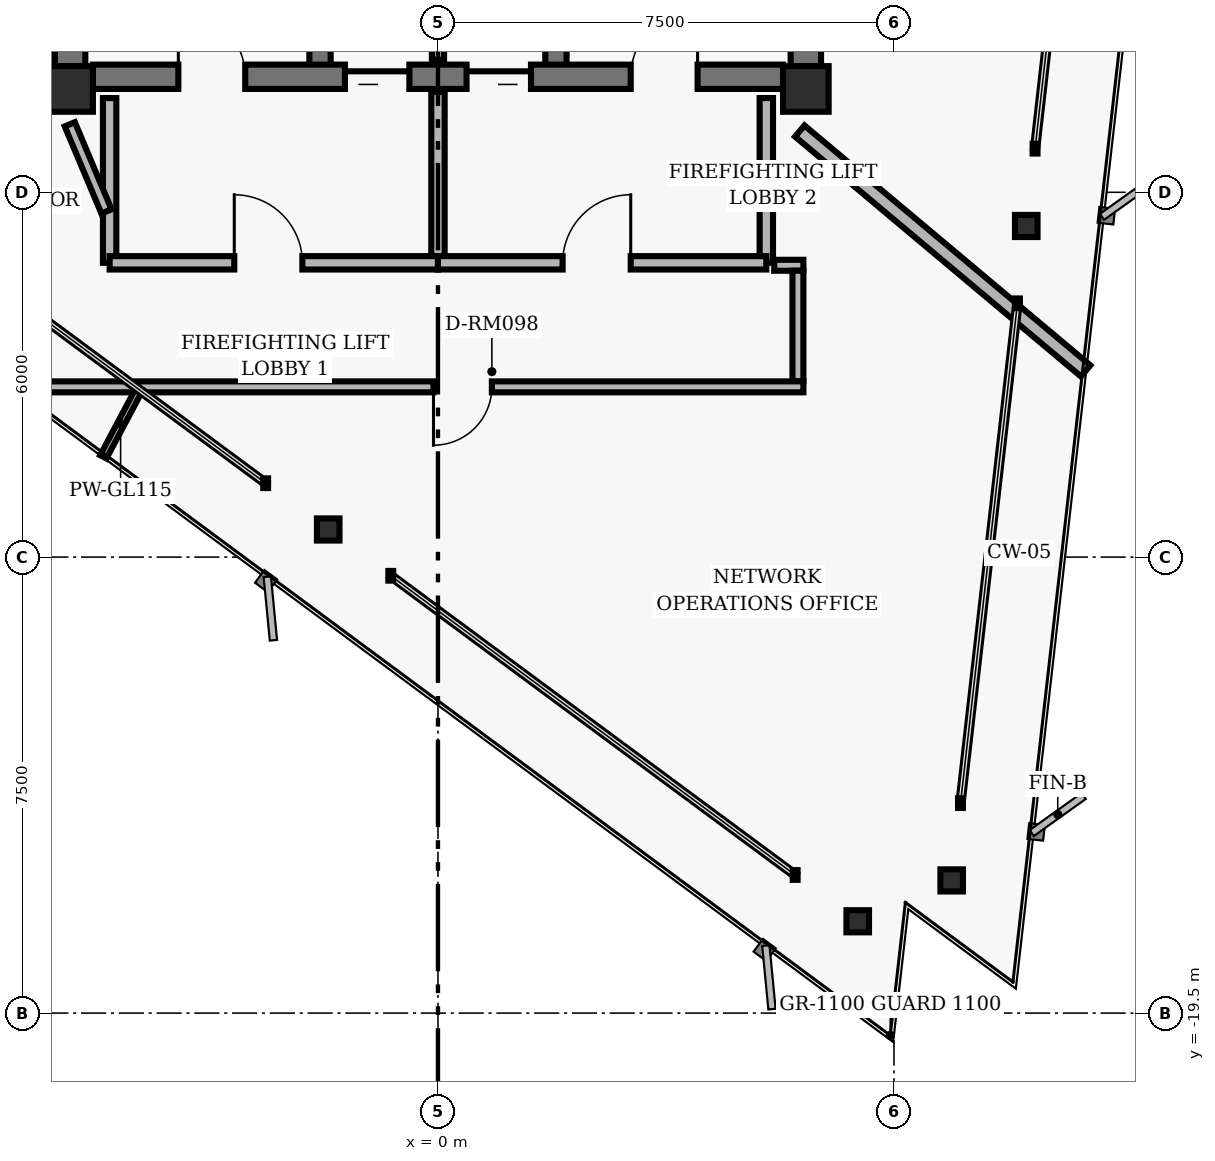
"""IFC4 building model, lengths in metres.
Left out: names, types, materials, properties, quantities, classifications, styles, units other than length and angle.
Written with IfcOpenShell. Run it as: python <this file> out.ifc"""

import sys

from ifc_helpers import new_model, si_unit, direction, frame, frame_2d, origin, origin_2d, place, context, subcontext, project, spatial, rectangle, hollow_rectangle, i_section, extrude, element, fill, save


model = new_model("IFC4")
c1 = context("Model", 3, precision=1e-05, world=origin(), true_north=direction((0.0, 1.0)))
c2 = subcontext(c1, "Body", "Model", "MODEL_VIEW")
j1 = project(units=[si_unit("LENGTHUNIT", "METRE"), si_unit("PLANEANGLEUNIT", "RADIAN")], contexts=[c1])
p1 = place(None, origin())
s1 = spatial("IfcSite", under=j1, at=p1, CompositionType="ELEMENT")
p2 = place(p1, origin())
s2 = spatial("IfcBuilding", under=s1, at=p2, CompositionType="ELEMENT")
p3 = place(p2, frame((0.0, 0.0, 236.16)))
s3 = spatial("IfcBuildingStorey", under=s2, at=p3, CompositionType="ELEMENT", Elevation=236.16)
for number, where, z_axis, x_axis in (
    (1, (-6.05, -4.3, 0.0), (0.0, 0.0, 1.0), (1.0, 0.0, 0.0)),
    (2, (6.05, -4.3, 0.0), (0.0, 0.0, 1.0), (1.0, 0.0, 0.0)),
):
    element("IfcColumn", number, at=place(p3, frame(where, z_axis=z_axis, x_axis=x_axis)), inside=s3, PredefinedType="COLUMN", context=c2, shape_type="SweptSolid", body=[
        extrude(hollow_rectangle(XDim=0.75, YDim=0.75, WallThickness=0.05, InnerFilletRadius=0.02, OuterFilletRadius=0.04, at=origin_2d()), origin(), (0.0, 0.0, 1.0), 3.04),
    ])
for number, where, z_axis, x_axis in (
    (3, (-6.05, -3.925, 0.0), (0.0, 0.0, 1.0), (0.0, 1.0, 0.0)),
    (4, (6.05, -3.925, 0.0), (0.0, 0.0, 1.0), (0.0, 1.0, 0.0)),
):
    element("IfcWall", number, at=place(p3, frame(where, z_axis=z_axis, x_axis=x_axis)), inside=s3, PredefinedType="SHEAR", context=c2, shape_type="SweptSolid", body=[
        extrude(rectangle(XDim=3.55, YDim=0.5, at=frame_2d((1.775, 0.0))), origin(), (0.0, 0.0, 1.0), 2.618),
    ])
for number, where, z_axis, x_axis in (
    (5, (-1.94, -4.1, 0.0), (0.0, 0.0, 1.0), (0.0, 1.0, 0.0)),
    (6, (1.94, -4.1, 0.0), (0.0, 0.0, 1.0), (0.0, 1.0, 0.0)),
):
    element("IfcWall", number, at=place(p3, frame(where, z_axis=z_axis, x_axis=x_axis)), inside=s3, PredefinedType="SHEAR", context=c2, shape_type="SweptSolid", body=[
        extrude(rectangle(XDim=8.2, YDim=0.35, at=frame_2d((4.1, 0.0))), origin(), (0.0, 0.0, 1.0), 2.618),
    ])
p4 = place(p3, frame((-5.675, -4.1, 0.0), z_axis=(0.0, 0.0, 1.0), x_axis=(1.0, 0.0, 0.0)))
e7 = element("IfcWall", 7, at=p4, inside=s3, PredefinedType="SHEAR", context=c2, shape_type="SweptSolid", body=[
    extrude(rectangle(XDim=11.35, YDim=0.4, at=frame_2d((5.675, 0.0))), origin(), (0.0, 0.0, 1.0), 2.618),
])
p5 = place(p4, frame((1.405, 0.0, 0.0)))
e8 = element("IfcOpeningElement", 8, at=p5, cuts=e7, PredefinedType="OPENING", context=c2, shape_type="SweptSolid", body=[
    extrude(rectangle(XDim=1.1, YDim=2.04, at=frame_2d((0.55, 1.02))), frame((0.0, 0.21, 0.0), z_axis=(0.0, -1.0, 0.0), x_axis=(1.0, 0.0, 0.0)), (0.0, 0.0, 1.0), 0.42),
])
p6 = place(p4, frame((8.845, 0.0, 0.0)))
e9 = element("IfcOpeningElement", 9, at=p6, cuts=e7, PredefinedType="OPENING", context=c2, shape_type="SweptSolid", body=[
    extrude(rectangle(XDim=1.1, YDim=2.04, at=frame_2d((0.55, 1.02))), frame((0.0, 0.21, 0.0), z_axis=(0.0, -1.0, 0.0), x_axis=(1.0, 0.0, 0.0)), (0.0, 0.0, 1.0), 0.42),
])
p7 = place(p4, frame((4.145, 0.0, 0.0)))
e10 = element("IfcOpeningElement", 10, at=p7, cuts=e7, PredefinedType="OPENING", context=c2, shape_type="SweptSolid", body=[
    extrude(rectangle(XDim=1.06, YDim=2.04, at=frame_2d((0.53, 1.02))), frame((0.0, 0.21, 0.0), z_axis=(0.0, -1.0, 0.0), x_axis=(1.0, 0.0, 0.0)), (0.0, 0.0, 1.0), 0.42),
])
p8 = place(p4, frame((6.145, 0.0, 0.0)))
e11 = element("IfcOpeningElement", 11, at=p8, cuts=e7, PredefinedType="OPENING", context=c2, shape_type="SweptSolid", body=[
    extrude(rectangle(XDim=1.06, YDim=2.04, at=frame_2d((0.53, 1.02))), frame((0.0, 0.21, 0.0), z_axis=(0.0, -1.0, 0.0), x_axis=(1.0, 0.0, 0.0)), (0.0, 0.0, 1.0), 0.42),
])
for number, where, z_axis, x_axis in (
    (12, (8.448, -17.318, 0.0), (0.0, 0.0, 1.0), (1.0, 0.0, 0.0)),
    (13, (9.675, -6.554, 0.0), (0.0, 0.0, 1.0), (1.0, 0.0, 0.0)),
    (14, (-1.805, -11.546, 0.0), (0.0, 0.0, 1.0), (1.0, 0.0, 0.0)),
    (15, (6.903, -17.99, 0.0), (0.0, 0.0, 1.0), (1.0, 0.0, 0.0)),
):
    element("IfcColumn", number, at=place(p3, frame(where, z_axis=z_axis, x_axis=x_axis)), inside=s3, PredefinedType="COLUMN", context=c2, shape_type="SweptSolid", body=[
        extrude(i_section(OverallWidth=0.371, OverallDepth=0.364, WebThickness=0.013, FlangeThickness=0.022, FilletRadius=0.015, at=origin_2d()), origin(), (0.0, 0.0, 1.0), 3.04),
    ])
p9 = place(p3, frame((0.0, -3.82, 0.0), z_axis=(0.0, 0.0, 1.0), x_axis=(0.0, 1.0, 0.0)))
e16 = element("IfcWall", 16, at=p9, inside=s3, PredefinedType="PARTITIONING", context=c2, shape_type="SweptSolid", body=[
    extrude(rectangle(XDim=2.67, YDim=0.2, at=frame_2d((1.335, 0.0))), origin(), (0.0, 0.0, 1.0), 2.593),
])
for number, where, z_axis, x_axis in (
    (17, (-5.4, -7.16, 0.0), (0.0, 0.0, 1.0), (0.0, 1.0, 0.0)),
    (18, (5.4, -7.16, 0.0), (0.0, 0.0, 1.0), (0.0, 1.0, 0.0)),
):
    element("IfcWall", number, at=place(p3, frame(where, z_axis=z_axis, x_axis=x_axis)), inside=s3, PredefinedType="PARTITIONING", context=c2, shape_type="SweptSolid", body=[
        extrude(rectangle(XDim=2.71, YDim=0.22, at=frame_2d((1.355, 0.0))), origin(), (0.0, 0.0, 1.0), 2.593),
    ])
p10 = place(p3, frame((0.0, -7.16, 0.0), z_axis=(0.0, 0.0, 1.0), x_axis=(0.0, 1.0, 0.0)))
e19 = element("IfcWall", 19, at=p10, inside=s3, PredefinedType="PARTITIONING", context=c2, shape_type="SweptSolid", body=[
    extrude(rectangle(XDim=2.81, YDim=0.22, at=frame_2d((1.405, 0.0))), origin(), (0.0, 0.0, 1.0), 2.593),
])
p11 = place(p3, frame((-5.4, -7.16, 0.0), z_axis=(0.0, 0.0, 1.0), x_axis=(1.0, 0.0, 0.0)))
e20 = element("IfcWall", 20, at=p11, inside=s3, PredefinedType="PARTITIONING", context=c2, shape_type="SweptSolid", body=[
    extrude(rectangle(XDim=5.4, YDim=0.22, at=frame_2d((2.7, 0.0))), origin(), (0.0, 0.0, 1.0), 2.215),
])
p12 = place(p11, frame((2.05, 0.0, 0.0)))
e21 = element("IfcOpeningElement", 21, at=p12, cuts=e20, PredefinedType="OPENING", context=c2, shape_type="SweptSolid", body=[
    extrude(rectangle(XDim=1.12, YDim=2.02, at=frame_2d((0.56, 1.01))), frame((0.0, 0.12, 0.0), z_axis=(0.0, -1.0, 0.0), x_axis=(1.0, 0.0, 0.0)), (0.0, 0.0, 1.0), 0.24),
])
p13 = place(p3, frame((0.0, -7.16, 0.0), z_axis=(0.0, 0.0, 1.0), x_axis=(1.0, 0.0, 0.0)))
e22 = element("IfcWall", 22, at=p13, inside=s3, PredefinedType="PARTITIONING", context=c2, shape_type="SweptSolid", body=[
    extrude(rectangle(XDim=5.4, YDim=0.22, at=frame_2d((2.7, 0.0))), origin(), (0.0, 0.0, 1.0), 2.593),
])
p14 = place(p13, frame((2.05, 0.0, 0.0)))
e23 = element("IfcOpeningElement", 23, at=p14, cuts=e22, PredefinedType="OPENING", context=c2, shape_type="SweptSolid", body=[
    extrude(rectangle(XDim=1.12, YDim=2.02, at=frame_2d((0.56, 1.01))), frame((0.0, 0.12, 0.0), z_axis=(0.0, -1.0, 0.0), x_axis=(1.0, 0.0, 0.0)), (0.0, 0.0, 1.0), 0.24),
])
p15 = place(p3, frame((-6.055, -4.882, 0.0), z_axis=(0.0, 0.0, 1.0), x_axis=(0.387579540458, -0.921836265189, 0.0)))
e24 = element("IfcWall", 24, at=p15, inside=s3, PredefinedType="PARTITIONING", context=c2, shape_type="SweptSolid", body=[
    extrude(rectangle(XDim=1.555, YDim=0.18, at=frame_2d((0.777, 0.0))), origin(), (0.0, 0.0, 1.0), 2.073),
])
p16 = place(p3, frame((5.53, -7.2, 0.0), z_axis=(0.0, 0.0, 1.0), x_axis=(1.0, 0.0, 0.0)))
e25 = element("IfcWall", 25, at=p16, inside=s3, PredefinedType="PARTITIONING", context=c2, shape_type="SweptSolid", body=[
    extrude(rectangle(XDim=0.48, YDim=0.18, at=frame_2d((0.24, 0.0))), origin(), (0.0, 0.0, 1.0), 2.593),
])
p17 = place(p3, frame((5.92, -7.29, 0.0), z_axis=(0.0, 0.0, 1.0), x_axis=(0.0, -1.0, 0.0)))
e26 = element("IfcWall", 26, at=p17, inside=s3, PredefinedType="PARTITIONING", context=c2, shape_type="SweptSolid", body=[
    extrude(rectangle(XDim=1.82, YDim=0.18, at=frame_2d((0.91, 0.0))), origin(), (0.0, 0.0, 1.0), 2.073),
])
p18 = place(p3, frame((6.01, -9.2, 0.0), z_axis=(0.0, 0.0, 1.0), x_axis=(-1.0, 0.0, 0.0)))
e27 = element("IfcWall", 27, at=p18, inside=s3, PredefinedType="PARTITIONING", context=c2, shape_type="SweptSolid", body=[
    extrude(rectangle(XDim=12.84, YDim=0.18, at=frame_2d((6.42, 0.0))), origin(), (0.0, 0.0, 1.0), 2.593),
])
p19 = place(p18, frame((5.124, 0.0, 0.0)))
e28 = element("IfcOpeningElement", 28, at=p19, cuts=e27, PredefinedType="OPENING", context=c2, shape_type="SweptSolid", body=[
    extrude(rectangle(XDim=0.96, YDim=2.02, at=frame_2d((0.48, 1.01))), frame((0.0, 0.1, 0.0), z_axis=(0.0, -1.0, 0.0), x_axis=(1.0, 0.0, 0.0)), (0.0, 0.0, 1.0), 0.2),
])
p20 = place(p3, frame((-4.934, -9.28, 0.0), z_axis=(0.0, 0.0, 1.0), x_axis=(-0.469449445938, -0.88295935224, 0.0)))
e29 = element("IfcWall", 29, at=p20, inside=s3, PredefinedType="MOVABLE", context=c2, shape_type="SweptSolid", body=[
    extrude(rectangle(XDim=1.213, YDim=0.115, at=frame_2d((0.607, 0.0))), origin(), (0.0, 0.0, 1.0), 2.593),
])
p21 = place(p3, frame((5.95, -4.993, 0.0), z_axis=(0.0, 0.0, 1.0), x_axis=(0.766055051894, -0.642774966428, 0.0)))
e30 = element("IfcWall", 30, at=p21, inside=s3, PredefinedType="PARTITIONING", context=c2, shape_type="SweptSolid", body=[
    extrude(rectangle(XDim=6.137, YDim=0.24, at=frame_2d((3.069, 0.0))), origin(), (0.0, 0.0, 1.0), 2.593),
])
p22 = place(p5, origin())
e31 = element("IfcDoor", 31, at=p22, inside=s3, OperationType="SINGLE_SWING_LEFT", PredefinedType="DOOR", context=c2, shape_type="SweptSolid", body=[
    extrude(rectangle(XDim=1.1, YDim=2.04, at=frame_2d((0.55, 1.02))), frame((0.0, 0.025, 0.0), z_axis=(0.0, -1.0, 0.0), x_axis=(1.0, 0.0, 0.0)), (0.0, 0.0, 1.0), 0.05),
])
fill(e8, e31)
p23 = place(p6, origin())
e32 = element("IfcDoor", 32, at=p23, inside=s3, OperationType="SINGLE_SWING_RIGHT", PredefinedType="DOOR", context=c2, shape_type="SweptSolid", body=[
    extrude(rectangle(XDim=1.1, YDim=2.04, at=frame_2d((0.55, 1.02))), frame((0.0, 0.025, 0.0), z_axis=(0.0, -1.0, 0.0), x_axis=(1.0, 0.0, 0.0)), (0.0, 0.0, 1.0), 0.05),
])
fill(e9, e32)
p24 = place(p7, origin())
e33 = element("IfcDoor", 33, at=p24, inside=s3, OperationType="SLIDING_TO_LEFT", PredefinedType="DOOR", context=c2, shape_type="SweptSolid", body=[
    extrude(rectangle(XDim=1.06, YDim=2.04, at=frame_2d((0.53, 1.02))), frame((0.0, 0.025, 0.0), z_axis=(0.0, -1.0, 0.0), x_axis=(1.0, 0.0, 0.0)), (0.0, 0.0, 1.0), 0.05),
])
fill(e10, e33)
p25 = place(p8, origin())
e34 = element("IfcDoor", 34, at=p25, inside=s3, OperationType="SLIDING_TO_RIGHT", PredefinedType="DOOR", context=c2, shape_type="SweptSolid", body=[
    extrude(rectangle(XDim=1.06, YDim=2.04, at=frame_2d((0.53, 1.02))), frame((0.0, 0.025, 0.0), z_axis=(0.0, -1.0, 0.0), x_axis=(1.0, 0.0, 0.0)), (0.0, 0.0, 1.0), 0.05),
])
fill(e11, e34)
p26 = place(p12, origin())
e35 = element("IfcDoor", 35, at=p26, inside=s3, OperationType="SINGLE_SWING_LEFT", PredefinedType="DOOR", context=c2, shape_type="SweptSolid", body=[
    extrude(rectangle(XDim=1.12, YDim=2.02, at=frame_2d((0.56, 1.01))), frame((0.0, 0.025, 0.0), z_axis=(0.0, -1.0, 0.0), x_axis=(1.0, 0.0, 0.0)), (0.0, 0.0, 1.0), 0.05),
])
fill(e21, e35)
p27 = place(p14, origin())
e36 = element("IfcDoor", 36, at=p27, inside=s3, OperationType="SINGLE_SWING_RIGHT", PredefinedType="DOOR", context=c2, shape_type="SweptSolid", body=[
    extrude(rectangle(XDim=1.12, YDim=2.02, at=frame_2d((0.56, 1.01))), frame((0.0, 0.025, 0.0), z_axis=(0.0, -1.0, 0.0), x_axis=(1.0, 0.0, 0.0)), (0.0, 0.0, 1.0), 0.05),
])
fill(e23, e36)
p28 = place(p19, origin())
e37 = element("IfcDoor", 37, at=p28, inside=s3, OperationType="SINGLE_SWING_RIGHT", PredefinedType="DOOR", context=c2, shape_type="SweptSolid", body=[
    extrude(rectangle(XDim=0.96, YDim=2.02, at=frame_2d((0.48, 1.01))), frame((0.0, 0.025, 0.0), z_axis=(0.0, -1.0, 0.0), x_axis=(1.0, 0.0, 0.0)), (0.0, 0.0, 1.0), 0.05),
])
fill(e28, e37)
save(model, sys.argv[1])
